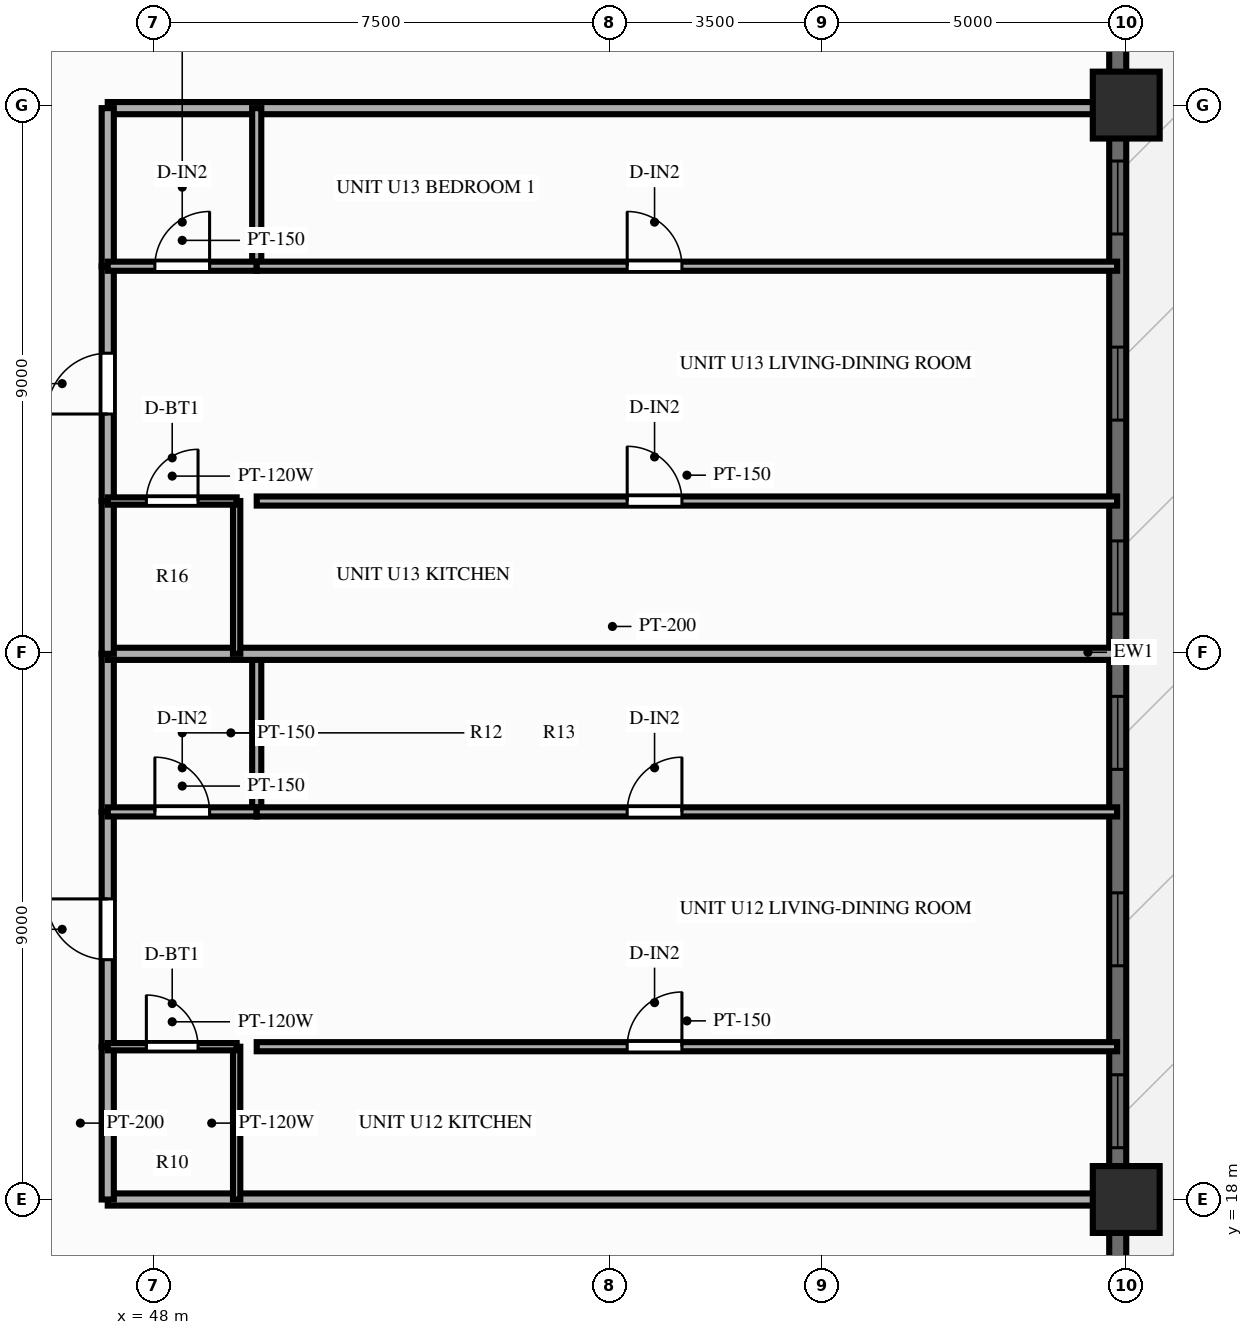
"""IFC4 building model, lengths in metres.
Left out: names, types, materials, properties, quantities, classifications, styles, units other than length and angle.
Written with IfcOpenShell. Run it as: python <this file> out.ifc"""

import sys

from ifc_helpers import new_model, si_unit, direction, frame, frame_2d, origin, origin_2d, place, context, subcontext, project, spatial, rectangle, extrude, source, transform, mapped, element, fill, save


model = new_model("IFC4")
c1 = context("Model", 3, precision=1e-05, world=origin(), true_north=direction((0.0, 1.0)))
c2 = subcontext(c1, "Body", "Model", "MODEL_VIEW")
j1 = project(units=[si_unit("LENGTHUNIT", "METRE"), si_unit("PLANEANGLEUNIT", "RADIAN")], contexts=[c1])
p1 = place(None, origin())
s1 = spatial("IfcSite", under=j1, at=p1, CompositionType="ELEMENT")
p2 = place(p1, origin())
s2 = spatial("IfcBuilding", under=s1, at=p2, CompositionType="ELEMENT")
p3 = place(p2, frame((0.0, 0.0, 34.4)))
s3 = spatial("IfcBuildingStorey", under=s2, at=p3, CompositionType="ELEMENT", Elevation=34.4)
m1 = source(origin(), c2, "Body", "SweptSolid", [
    extrude(rectangle(XDim=1.1, YDim=1.1, at=origin_2d()), origin(), (0.0, 0.0, 1.0), 3.0),
])
for number, where, z_axis, x_axis in (
    (1, (64.0, 18.0, 0.0), (0.0, 0.0, 1.0), (1.0, 0.0, 0.0)),
    (2, (64.0, 36.0, 0.0), (0.0, 0.0, 1.0), (1.0, 0.0, 0.0)),
):
    element("IfcColumn", number, at=place(p3, frame(where, z_axis=z_axis, x_axis=x_axis)), inside=s3, PredefinedType="COLUMN", context=c2, shape_type="MappedRepresentation", body=[
        mapped(m1, transform((0.0, 0.0, 0.0), scale=1.0)),
    ])
p4 = place(p3, frame((63.86, 6.5, 0.0), z_axis=(0.0, 0.0, 1.0), x_axis=(0.0, 1.0, 0.0)))
e3 = element("IfcWall", 3, at=p4, inside=s3, PredefinedType="SOLIDWALL", context=c2, shape_type="SweptSolid", body=[
    extrude(rectangle(XDim=41.0, YDim=0.28, at=frame_2d((20.5, 0.0))), origin(), (0.0, 0.0, 1.0), 2.28),
])
p5 = place(p4, frame((5.15, 0.0, 0.25)))
e4 = element("IfcOpeningElement", 4, at=p5, cuts=e3, PredefinedType="OPENING", context=c2, shape_type="SweptSolid", body=[
    extrude(rectangle(XDim=1.2, YDim=1.5, at=frame_2d((0.6, 0.75))), frame((0.0, 0.152, 0.0), z_axis=(0.0, -1.0, 0.0), x_axis=(1.0, 0.0, 0.0)), (0.0, 0.0, 1.0), 0.304),
])
p6 = place(p4, frame((12.352, 0.0, 0.25)))
e5 = element("IfcOpeningElement", 5, at=p6, cuts=e3, PredefinedType="OPENING", context=c2, shape_type="SweptSolid", body=[
    extrude(rectangle(XDim=1.2, YDim=1.5, at=frame_2d((0.6, 0.75))), frame((0.0, 0.152, 0.0), z_axis=(0.0, -1.0, 0.0), x_axis=(1.0, 0.0, 0.0)), (0.0, 0.0, 1.0), 0.304),
])
p7 = place(p4, frame((15.344, 0.0, 0.25)))
e6 = element("IfcOpeningElement", 6, at=p7, cuts=e3, PredefinedType="OPENING", context=c2, shape_type="SweptSolid", body=[
    extrude(rectangle(XDim=1.2, YDim=1.5, at=frame_2d((0.6, 0.75))), frame((0.0, 0.152, 0.0), z_axis=(0.0, -1.0, 0.0), x_axis=(1.0, 0.0, 0.0)), (0.0, 0.0, 1.0), 0.304),
])
p8 = place(p4, frame((18.575, 0.0, 0.25)))
e7 = element("IfcOpeningElement", 7, at=p8, cuts=e3, PredefinedType="OPENING", context=c2, shape_type="SweptSolid", body=[
    extrude(rectangle(XDim=1.2, YDim=1.5, at=frame_2d((0.6, 0.75))), frame((0.0, 0.152, 0.0), z_axis=(0.0, -1.0, 0.0), x_axis=(1.0, 0.0, 0.0)), (0.0, 0.0, 1.0), 0.304),
])
p9 = place(p4, frame((21.132, 0.0, 0.25)))
e8 = element("IfcOpeningElement", 8, at=p9, cuts=e3, PredefinedType="OPENING", context=c2, shape_type="SweptSolid", body=[
    extrude(rectangle(XDim=1.2, YDim=1.5, at=frame_2d((0.6, 0.75))), frame((0.0, 0.152, 0.0), z_axis=(0.0, -1.0, 0.0), x_axis=(1.0, 0.0, 0.0)), (0.0, 0.0, 1.0), 0.304),
])
p10 = place(p4, frame((24.319, 0.0, 0.25)))
e9 = element("IfcOpeningElement", 9, at=p10, cuts=e3, PredefinedType="OPENING", context=c2, shape_type="SweptSolid", body=[
    extrude(rectangle(XDim=1.2, YDim=1.5, at=frame_2d((0.6, 0.75))), frame((0.0, 0.152, 0.0), z_axis=(0.0, -1.0, 0.0), x_axis=(1.0, 0.0, 0.0)), (0.0, 0.0, 1.0), 0.304),
])
p11 = place(p4, frame((27.38, 0.0, 0.25)))
e10 = element("IfcOpeningElement", 10, at=p11, cuts=e3, PredefinedType="OPENING", context=c2, shape_type="SweptSolid", body=[
    extrude(rectangle(XDim=1.2, YDim=1.5, at=frame_2d((0.6, 0.75))), frame((0.0, 0.152, 0.0), z_axis=(0.0, -1.0, 0.0), x_axis=(1.0, 0.0, 0.0)), (0.0, 0.0, 1.0), 0.304),
])
p12 = place(p4, frame((36.05, 0.0, 0.0), z_axis=(0.0, 0.0, 1.0), x_axis=(-1.0, 0.0, 0.0)))
e11 = element("IfcOpeningElement", 11, at=p12, cuts=e3, PredefinedType="OPENING", context=c2, shape_type="SweptSolid", body=[
    extrude(rectangle(XDim=1.6, YDim=2.15, at=frame_2d((0.8, 1.075))), frame((0.0, 0.152, 0.0), z_axis=(0.0, -1.0, 0.0), x_axis=(1.0, 0.0, 0.0)), (0.0, 0.0, 1.0), 0.304),
])
for number, where, z_axis, x_axis in (
    (12, (47.25, 18.0, 0.0), (0.0, 0.0, 1.0), (1.0, 0.0, 0.0)),
    (13, (47.25, 35.95, 0.0), (0.0, 0.0, 1.0), (1.0, 0.0, 0.0)),
):
    element("IfcWall", number, at=place(p3, frame(where, z_axis=z_axis, x_axis=x_axis)), inside=s3, PredefinedType="PARTITIONING", context=c2, shape_type="SweptSolid", body=[
        extrude(rectangle(XDim=16.6, YDim=0.2, at=frame_2d((8.3, 0.0))), origin(), (0.0, 0.0, 1.0), 2.24),
    ])
p13 = place(p3, frame((47.25, 18.0, 0.0), z_axis=(0.0, 0.0, 1.0), x_axis=(0.0, 1.0, 0.0)))
e14 = element("IfcWall", 14, at=p13, inside=s3, PredefinedType="PARTITIONING", context=c2, shape_type="SweptSolid", body=[
    extrude(rectangle(XDim=2.513, YDim=0.2, at=frame_2d((1.256, 0.0))), origin(), (0.0, 0.0, 1.0), 2.79),
])
p14 = place(p3, frame((47.25, 20.513, 0.0), z_axis=(0.0, 0.0, 1.0), x_axis=(0.0, 1.0, 0.0)))
e15 = element("IfcWall", 15, at=p14, inside=s3, PredefinedType="PARTITIONING", context=c2, shape_type="SweptSolid", body=[
    extrude(rectangle(XDim=3.862, YDim=0.2, at=frame_2d((1.931, 0.0))), origin(), (0.0, 0.0, 1.0), 2.79),
])
p15 = place(p14, frame((1.431, 0.0, 0.0)))
e16 = element("IfcOpeningElement", 16, at=p15, cuts=e15, PredefinedType="OPENING", context=c2, shape_type="SweptSolid", body=[
    extrude(rectangle(XDim=1.0, YDim=2.15, at=frame_2d((0.5, 1.075))), frame((0.0, 0.112, 0.0), z_axis=(0.0, -1.0, 0.0), x_axis=(1.0, 0.0, 0.0)), (0.0, 0.0, 1.0), 0.224),
])
p16 = place(p3, frame((47.25, 24.375, 0.0), z_axis=(0.0, 0.0, 1.0), x_axis=(0.0, 1.0, 0.0)))
e17 = element("IfcWall", 17, at=p16, inside=s3, PredefinedType="PARTITIONING", context=c2, shape_type="SweptSolid", body=[
    extrude(rectangle(XDim=2.6, YDim=0.2, at=frame_2d((1.3, 0.0))), origin(), (0.0, 0.0, 1.0), 2.79),
])
p17 = place(p3, frame((49.37, 18.0, 0.0), z_axis=(0.0, 0.0, 1.0), x_axis=(0.0, 1.0, 0.0)))
e18 = element("IfcWall", 18, at=p17, inside=s3, PredefinedType="PARTITIONING", context=c2, shape_type="SweptSolid", body=[
    extrude(rectangle(XDim=2.513, YDim=0.12, at=frame_2d((1.256, 0.0))), origin(), (0.0, 0.0, 1.0), 2.79),
])
p18 = place(p3, frame((49.7, 24.375, 0.0), z_axis=(0.0, 0.0, 1.0), x_axis=(0.0, 1.0, 0.0)))
e19 = element("IfcWall", 19, at=p18, inside=s3, PredefinedType="PARTITIONING", context=c2, shape_type="SweptSolid", body=[
    extrude(rectangle(XDim=2.6, YDim=0.15, at=frame_2d((1.3, 0.0))), origin(), (0.0, 0.0, 1.0), 2.79),
])
p19 = place(p3, frame((47.25, 20.513, 0.0), z_axis=(0.0, 0.0, 1.0), x_axis=(1.0, 0.0, 0.0)))
e20 = element("IfcWall", 20, at=p19, inside=s3, PredefinedType="PARTITIONING", context=c2, shape_type="SweptSolid", body=[
    extrude(rectangle(XDim=2.12, YDim=0.12, at=frame_2d((1.06, 0.0))), origin(), (0.0, 0.0, 1.0), 2.79),
])
p20 = place(p19, frame((0.635, 0.0, 0.0)))
e21 = element("IfcOpeningElement", 21, at=p20, cuts=e20, PredefinedType="OPENING", context=c2, shape_type="SweptSolid", body=[
    extrude(rectangle(XDim=0.85, YDim=2.05, at=frame_2d((0.425, 1.025))), frame((0.0, 0.072, 0.0), z_axis=(0.0, -1.0, 0.0), x_axis=(1.0, 0.0, 0.0)), (0.0, 0.0, 1.0), 0.144),
])
p21 = place(p3, frame((49.7, 20.513, 0.0), z_axis=(0.0, 0.0, 1.0), x_axis=(1.0, 0.0, 0.0)))
e22 = element("IfcWall", 22, at=p21, inside=s3, PredefinedType="PARTITIONING", context=c2, shape_type="SweptSolid", body=[
    extrude(rectangle(XDim=14.15, YDim=0.15, at=frame_2d((7.075, 0.0))), origin(), (0.0, 0.0, 1.0), 2.79),
])
p22 = place(p21, frame((6.093, 0.0, 0.0)))
e23 = element("IfcOpeningElement", 23, at=p22, cuts=e22, PredefinedType="OPENING", context=c2, shape_type="SweptSolid", body=[
    extrude(rectangle(XDim=0.9, YDim=2.1, at=frame_2d((0.45, 1.05))), frame((0.0, 0.087, 0.0), z_axis=(0.0, -1.0, 0.0), x_axis=(1.0, 0.0, 0.0)), (0.0, 0.0, 1.0), 0.174),
])
p23 = place(p3, frame((47.25, 24.375, 0.0), z_axis=(0.0, 0.0, 1.0), x_axis=(1.0, 0.0, 0.0)))
e24 = element("IfcWall", 24, at=p23, inside=s3, PredefinedType="PARTITIONING", context=c2, shape_type="SweptSolid", body=[
    extrude(rectangle(XDim=2.45, YDim=0.15, at=frame_2d((1.225, 0.0))), origin(), (0.0, 0.0, 1.0), 2.79),
])
p24 = place(p23, frame((0.775, 0.0, 0.0)))
e25 = element("IfcOpeningElement", 25, at=p24, cuts=e24, PredefinedType="OPENING", context=c2, shape_type="SweptSolid", body=[
    extrude(rectangle(XDim=0.9, YDim=2.1, at=frame_2d((0.45, 1.05))), frame((0.0, 0.087, 0.0), z_axis=(0.0, -1.0, 0.0), x_axis=(1.0, 0.0, 0.0)), (0.0, 0.0, 1.0), 0.174),
])
p25 = place(p3, frame((49.7, 24.375, 0.0), z_axis=(0.0, 0.0, 1.0), x_axis=(1.0, 0.0, 0.0)))
e26 = element("IfcWall", 26, at=p25, inside=s3, PredefinedType="PARTITIONING", context=c2, shape_type="SweptSolid", body=[
    extrude(rectangle(XDim=14.15, YDim=0.15, at=frame_2d((7.075, 0.0))), origin(), (0.0, 0.0, 1.0), 2.79),
])
p26 = place(p25, frame((6.093, 0.0, 0.0)))
e27 = element("IfcOpeningElement", 27, at=p26, cuts=e26, PredefinedType="OPENING", context=c2, shape_type="SweptSolid", body=[
    extrude(rectangle(XDim=0.9, YDim=2.1, at=frame_2d((0.45, 1.05))), frame((0.0, 0.087, 0.0), z_axis=(0.0, -1.0, 0.0), x_axis=(1.0, 0.0, 0.0)), (0.0, 0.0, 1.0), 0.174),
])
p27 = place(p3, frame((47.25, 26.975, 0.0), z_axis=(0.0, 0.0, 1.0), x_axis=(1.0, 0.0, 0.0)))
e28 = element("IfcWall", 28, at=p27, inside=s3, PredefinedType="PARTITIONING", context=c2, shape_type="SweptSolid", body=[
    extrude(rectangle(XDim=16.6, YDim=0.2, at=frame_2d((8.3, 0.0))), origin(), (0.0, 0.0, 1.0), 2.79),
])
p28 = place(p3, frame((47.25, 26.975, 0.0), z_axis=(0.0, 0.0, 1.0), x_axis=(0.0, 1.0, 0.0)))
e29 = element("IfcWall", 29, at=p28, inside=s3, PredefinedType="PARTITIONING", context=c2, shape_type="SweptSolid", body=[
    extrude(rectangle(XDim=2.513, YDim=0.2, at=frame_2d((1.256, 0.0))), origin(), (0.0, 0.0, 1.0), 2.79),
])
p29 = place(p3, frame((47.25, 29.488, 0.0), z_axis=(0.0, 0.0, 1.0), x_axis=(0.0, 1.0, 0.0)))
e30 = element("IfcWall", 30, at=p29, inside=s3, PredefinedType="PARTITIONING", context=c2, shape_type="SweptSolid", body=[
    extrude(rectangle(XDim=3.862, YDim=0.2, at=frame_2d((1.931, 0.0))), origin(), (0.0, 0.0, 1.0), 2.79),
])
p30 = place(p29, frame((1.431, 0.0, 0.0)))
e31 = element("IfcOpeningElement", 31, at=p30, cuts=e30, PredefinedType="OPENING", context=c2, shape_type="SweptSolid", body=[
    extrude(rectangle(XDim=1.0, YDim=2.15, at=frame_2d((0.5, 1.075))), frame((0.0, 0.112, 0.0), z_axis=(0.0, -1.0, 0.0), x_axis=(1.0, 0.0, 0.0)), (0.0, 0.0, 1.0), 0.224),
])
p31 = place(p3, frame((47.25, 33.35, 0.0), z_axis=(0.0, 0.0, 1.0), x_axis=(0.0, 1.0, 0.0)))
e32 = element("IfcWall", 32, at=p31, inside=s3, PredefinedType="PARTITIONING", context=c2, shape_type="SweptSolid", body=[
    extrude(rectangle(XDim=2.6, YDim=0.2, at=frame_2d((1.3, 0.0))), origin(), (0.0, 0.0, 1.0), 2.79),
])
p32 = place(p3, frame((49.37, 26.975, 0.0), z_axis=(0.0, 0.0, 1.0), x_axis=(0.0, 1.0, 0.0)))
e33 = element("IfcWall", 33, at=p32, inside=s3, PredefinedType="PARTITIONING", context=c2, shape_type="SweptSolid", body=[
    extrude(rectangle(XDim=2.513, YDim=0.12, at=frame_2d((1.256, 0.0))), origin(), (0.0, 0.0, 1.0), 2.79),
])
p33 = place(p3, frame((49.7, 33.35, 0.0), z_axis=(0.0, 0.0, 1.0), x_axis=(0.0, 1.0, 0.0)))
e34 = element("IfcWall", 34, at=p33, inside=s3, PredefinedType="PARTITIONING", context=c2, shape_type="SweptSolid", body=[
    extrude(rectangle(XDim=2.6, YDim=0.15, at=frame_2d((1.3, 0.0))), origin(), (0.0, 0.0, 1.0), 2.79),
])
p34 = place(p3, frame((47.25, 29.488, 0.0), z_axis=(0.0, 0.0, 1.0), x_axis=(1.0, 0.0, 0.0)))
e35 = element("IfcWall", 35, at=p34, inside=s3, PredefinedType="PARTITIONING", context=c2, shape_type="SweptSolid", body=[
    extrude(rectangle(XDim=2.12, YDim=0.12, at=frame_2d((1.06, 0.0))), origin(), (0.0, 0.0, 1.0), 2.79),
])
p35 = place(p34, frame((0.635, 0.0, 0.0)))
e36 = element("IfcOpeningElement", 36, at=p35, cuts=e35, PredefinedType="OPENING", context=c2, shape_type="SweptSolid", body=[
    extrude(rectangle(XDim=0.85, YDim=2.05, at=frame_2d((0.425, 1.025))), frame((0.0, 0.072, 0.0), z_axis=(0.0, -1.0, 0.0), x_axis=(1.0, 0.0, 0.0)), (0.0, 0.0, 1.0), 0.144),
])
p36 = place(p3, frame((49.7, 29.488, 0.0), z_axis=(0.0, 0.0, 1.0), x_axis=(1.0, 0.0, 0.0)))
e37 = element("IfcWall", 37, at=p36, inside=s3, PredefinedType="PARTITIONING", context=c2, shape_type="SweptSolid", body=[
    extrude(rectangle(XDim=14.15, YDim=0.15, at=frame_2d((7.075, 0.0))), origin(), (0.0, 0.0, 1.0), 2.79),
])
p37 = place(p36, frame((6.093, 0.0, 0.0)))
e38 = element("IfcOpeningElement", 38, at=p37, cuts=e37, PredefinedType="OPENING", context=c2, shape_type="SweptSolid", body=[
    extrude(rectangle(XDim=0.9, YDim=2.1, at=frame_2d((0.45, 1.05))), frame((0.0, 0.087, 0.0), z_axis=(0.0, -1.0, 0.0), x_axis=(1.0, 0.0, 0.0)), (0.0, 0.0, 1.0), 0.174),
])
p38 = place(p3, frame((47.25, 33.35, 0.0), z_axis=(0.0, 0.0, 1.0), x_axis=(1.0, 0.0, 0.0)))
e39 = element("IfcWall", 39, at=p38, inside=s3, PredefinedType="PARTITIONING", context=c2, shape_type="SweptSolid", body=[
    extrude(rectangle(XDim=2.45, YDim=0.15, at=frame_2d((1.225, 0.0))), origin(), (0.0, 0.0, 1.0), 2.79),
])
p39 = place(p38, frame((0.775, 0.0, 0.0)))
e40 = element("IfcOpeningElement", 40, at=p39, cuts=e39, PredefinedType="OPENING", context=c2, shape_type="SweptSolid", body=[
    extrude(rectangle(XDim=0.9, YDim=2.1, at=frame_2d((0.45, 1.05))), frame((0.0, 0.087, 0.0), z_axis=(0.0, -1.0, 0.0), x_axis=(1.0, 0.0, 0.0)), (0.0, 0.0, 1.0), 0.174),
])
p40 = place(p3, frame((49.7, 33.35, 0.0), z_axis=(0.0, 0.0, 1.0), x_axis=(1.0, 0.0, 0.0)))
e41 = element("IfcWall", 41, at=p40, inside=s3, PredefinedType="PARTITIONING", context=c2, shape_type="SweptSolid", body=[
    extrude(rectangle(XDim=14.15, YDim=0.15, at=frame_2d((7.075, 0.0))), origin(), (0.0, 0.0, 1.0), 2.79),
])
p41 = place(p40, frame((6.093, 0.0, 0.0)))
e42 = element("IfcOpeningElement", 42, at=p41, cuts=e41, PredefinedType="OPENING", context=c2, shape_type="SweptSolid", body=[
    extrude(rectangle(XDim=0.9, YDim=2.1, at=frame_2d((0.45, 1.05))), frame((0.0, 0.087, 0.0), z_axis=(0.0, -1.0, 0.0), x_axis=(1.0, 0.0, 0.0)), (0.0, 0.0, 1.0), 0.174),
])
m2 = source(origin(), c2, "Body", "SweptSolid", [
    extrude(rectangle(XDim=1.2, YDim=1.5, at=frame_2d((0.6, 0.75))), frame((0.0, 0.03, 0.0), z_axis=(0.0, -1.0, 0.0), x_axis=(1.0, 0.0, 0.0)), (0.0, 0.0, 1.0), 0.06),
])
p42 = place(p6, origin())
e43 = element("IfcWindow", 43, at=p42, inside=s3, PartitioningType="SINGLE_PANEL", PredefinedType="WINDOW", context=c2, shape_type="MappedRepresentation", body=[
    mapped(m2, transform((0.0, 0.0, 0.0), scale=1.0)),
])
fill(e5, e43)
p43 = place(p7, origin())
e44 = element("IfcWindow", 44, at=p43, inside=s3, PartitioningType="SINGLE_PANEL", PredefinedType="WINDOW", context=c2, shape_type="MappedRepresentation", body=[
    mapped(m2, transform((0.0, 0.0, 0.0), scale=1.0)),
])
fill(e6, e44)
p44 = place(p8, origin())
e45 = element("IfcWindow", 45, at=p44, inside=s3, PartitioningType="SINGLE_PANEL", PredefinedType="WINDOW", context=c2, shape_type="MappedRepresentation", body=[
    mapped(m2, transform((0.0, 0.0, 0.0), scale=1.0)),
])
fill(e7, e45)
p45 = place(p9, origin())
e46 = element("IfcWindow", 46, at=p45, inside=s3, PartitioningType="SINGLE_PANEL", PredefinedType="WINDOW", context=c2, shape_type="MappedRepresentation", body=[
    mapped(m2, transform((0.0, 0.0, 0.0), scale=1.0)),
])
fill(e8, e46)
p46 = place(p10, origin())
e47 = element("IfcWindow", 47, at=p46, inside=s3, PartitioningType="SINGLE_PANEL", PredefinedType="WINDOW", context=c2, shape_type="MappedRepresentation", body=[
    mapped(m2, transform((0.0, 0.0, 0.0), scale=1.0)),
])
fill(e9, e47)
p47 = place(p11, origin())
e48 = element("IfcWindow", 48, at=p47, inside=s3, PartitioningType="SINGLE_PANEL", PredefinedType="WINDOW", context=c2, shape_type="MappedRepresentation", body=[
    mapped(m2, transform((0.0, 0.0, 0.0), scale=1.0)),
])
fill(e10, e48)
m3 = source(origin(), c2, "Body", "SweptSolid", [
    extrude(rectangle(XDim=1.0, YDim=2.15, at=frame_2d((0.5, 1.075))), frame((0.0, 0.025, 0.0), z_axis=(0.0, -1.0, 0.0), x_axis=(1.0, 0.0, 0.0)), (0.0, 0.0, 1.0), 0.05),
])
p48 = place(p15, origin())
e49 = element("IfcDoor", 49, at=p48, inside=s3, OperationType="SINGLE_SWING_RIGHT", PredefinedType="DOOR", context=c2, shape_type="MappedRepresentation", body=[
    mapped(m3, transform((0.0, 0.0, 0.0), scale=1.0)),
])
fill(e16, e49)
m4 = source(origin(), c2, "Body", "SweptSolid", [
    extrude(rectangle(XDim=0.85, YDim=2.05, at=frame_2d((0.425, 1.025))), frame((0.0, 0.025, 0.0), z_axis=(0.0, -1.0, 0.0), x_axis=(1.0, 0.0, 0.0)), (0.0, 0.0, 1.0), 0.05),
])
p49 = place(p20, origin())
e50 = element("IfcDoor", 50, at=p49, inside=s3, OperationType="SINGLE_SWING_LEFT", PredefinedType="DOOR", context=c2, shape_type="MappedRepresentation", body=[
    mapped(m4, transform((0.0, 0.0, 0.0), scale=1.0)),
])
fill(e21, e50)
m5 = source(origin(), c2, "Body", "SweptSolid", [
    extrude(rectangle(XDim=0.9, YDim=2.1, at=frame_2d((0.45, 1.05))), frame((0.0, 0.025, 0.0), z_axis=(0.0, -1.0, 0.0), x_axis=(1.0, 0.0, 0.0)), (0.0, 0.0, 1.0), 0.05),
])
p50 = place(p22, origin())
e51 = element("IfcDoor", 51, at=p50, inside=s3, OperationType="SINGLE_SWING_RIGHT", PredefinedType="DOOR", context=c2, shape_type="MappedRepresentation", body=[
    mapped(m5, transform((0.0, 0.0, 0.0), scale=1.0)),
])
fill(e23, e51)
p51 = place(p24, origin())
e52 = element("IfcDoor", 52, at=p51, inside=s3, OperationType="SINGLE_SWING_LEFT", PredefinedType="DOOR", context=c2, shape_type="MappedRepresentation", body=[
    mapped(m5, transform((0.0, 0.0, 0.0), scale=1.0)),
])
fill(e25, e52)
p52 = place(p26, origin())
e53 = element("IfcDoor", 53, at=p52, inside=s3, OperationType="SINGLE_SWING_RIGHT", PredefinedType="DOOR", context=c2, shape_type="MappedRepresentation", body=[
    mapped(m5, transform((0.0, 0.0, 0.0), scale=1.0)),
])
fill(e27, e53)
p53 = place(p30, origin())
e54 = element("IfcDoor", 54, at=p53, inside=s3, OperationType="SINGLE_SWING_LEFT", PredefinedType="DOOR", context=c2, shape_type="MappedRepresentation", body=[
    mapped(m3, transform((0.0, 0.0, 0.0), scale=1.0)),
])
fill(e31, e54)
p54 = place(p35, origin())
e55 = element("IfcDoor", 55, at=p54, inside=s3, OperationType="SINGLE_SWING_RIGHT", PredefinedType="DOOR", context=c2, shape_type="MappedRepresentation", body=[
    mapped(m4, transform((0.0, 0.0, 0.0), scale=1.0)),
])
fill(e36, e55)
p55 = place(p37, origin())
e56 = element("IfcDoor", 56, at=p55, inside=s3, OperationType="SINGLE_SWING_LEFT", PredefinedType="DOOR", context=c2, shape_type="MappedRepresentation", body=[
    mapped(m5, transform((0.0, 0.0, 0.0), scale=1.0)),
])
fill(e38, e56)
p56 = place(p39, origin())
e57 = element("IfcDoor", 57, at=p56, inside=s3, OperationType="SINGLE_SWING_RIGHT", PredefinedType="DOOR", context=c2, shape_type="MappedRepresentation", body=[
    mapped(m5, transform((0.0, 0.0, 0.0), scale=1.0)),
])
fill(e40, e57)
p57 = place(p41, origin())
e58 = element("IfcDoor", 58, at=p57, inside=s3, OperationType="SINGLE_SWING_LEFT", PredefinedType="DOOR", context=c2, shape_type="MappedRepresentation", body=[
    mapped(m5, transform((0.0, 0.0, 0.0), scale=1.0)),
])
fill(e42, e58)
save(model, sys.argv[1])
